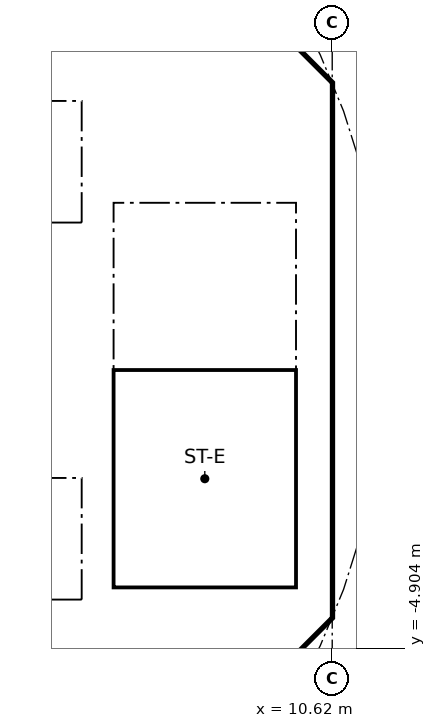
"""IFC4 building model, lengths in metres.
Left out: names, types, materials, properties, quantities, classifications, styles, units other than length and angle.
Written with IfcOpenShell. Run it as: python <this file> out.ifc"""

import sys

from ifc_helpers import new_model, si_unit, direction, frame, frame_2d, origin, place, context, subcontext, project, spatial, polyline, rectangle, outline, extrude, element, fill, save


model = new_model("IFC4")
c1 = context("Model", 3, precision=1e-05, world=origin(), true_north=direction((0.0, 1.0)))
c2 = subcontext(c1, "Body", "Model", "MODEL_VIEW")
j1 = project(units=[si_unit("LENGTHUNIT", "METRE"), si_unit("PLANEANGLEUNIT", "RADIAN")], contexts=[c1])
p1 = place(None, origin())
s1 = spatial("IfcSite", under=j1, at=p1, CompositionType="ELEMENT")
p2 = place(p1, origin())
s2 = spatial("IfcBuilding", under=s1, at=p2, CompositionType="ELEMENT")
p3 = place(p2, frame((0.0, 0.0, 219.6)))
s3 = spatial("IfcBuildingStorey", under=s2, at=p3, CompositionType="ELEMENT", Elevation=219.6)
p4 = place(p3, frame((9.988, 4.613, 0.0), z_axis=(0.0, 0.0, 1.0), x_axis=(-0.707106781187, 0.707106781187, 0.0)))
e1 = element("IfcWall", 1, at=p4, inside=s3, PredefinedType="SHEAR", context=c2, shape_type="SweptSolid", body=[
    extrude(rectangle(XDim=7.602, YDim=0.6, at=frame_2d((3.801, 0.0))), origin(), (0.0, 0.0, 1.0), 3.44),
])
p5 = place(p4, frame((3.201, 0.0, 0.0)))
e2 = element("IfcOpeningElement", 2, at=p5, cuts=e1, PredefinedType="OPENING", context=c2, shape_type="SweptSolid", body=[
    extrude(rectangle(XDim=1.2, YDim=2.1, at=frame_2d((0.6, 1.05))), frame((0.0, 0.31, 0.0), z_axis=(0.0, -1.0, 0.0), x_axis=(1.0, 0.0, 0.0)), (0.0, 0.0, 1.0), 0.62),
])
p6 = place(p3, frame((4.613, -9.988, 0.0), z_axis=(0.0, 0.0, 1.0), x_axis=(0.707106781187, 0.707106781187, 0.0)))
e3 = element("IfcWall", 3, at=p6, inside=s3, PredefinedType="SHEAR", context=c2, shape_type="SweptSolid", body=[
    extrude(rectangle(XDim=7.602, YDim=0.6, at=frame_2d((3.801, 0.0))), origin(), (0.0, 0.0, 1.0), 3.44),
])
p7 = place(p6, frame((3.201, 0.0, 0.0)))
e4 = element("IfcOpeningElement", 4, at=p7, cuts=e3, PredefinedType="OPENING", context=c2, shape_type="SweptSolid", body=[
    extrude(rectangle(XDim=1.2, YDim=2.1, at=frame_2d((0.6, 1.05))), frame((0.0, 0.31, 0.0), z_axis=(0.0, -1.0, 0.0), x_axis=(1.0, 0.0, 0.0)), (0.0, 0.0, 1.0), 0.62),
])
p8 = place(p3, frame((-6.7, 2.0, 0.0), z_axis=(0.0, 0.0, 1.0), x_axis=(1.0, 0.0, 0.0)))
e5 = element("IfcWall", 5, at=p8, inside=s3, PredefinedType="SOLIDWALL", context=c2, shape_type="SweptSolid", body=[
    extrude(rectangle(XDim=13.4, YDim=0.2, at=frame_2d((6.7, 0.0))), origin(), (0.0, 0.0, 1.0), 3.44),
])
p9 = place(p8, frame((7.25, 0.0, 0.0)))
e6 = element("IfcOpeningElement", 6, at=p9, cuts=e5, PredefinedType="OPENING", context=c2, shape_type="SweptSolid", body=[
    extrude(rectangle(XDim=1.1, YDim=2.1, at=frame_2d((0.55, 1.05))), frame((0.0, 0.11, 0.0), z_axis=(0.0, -1.0, 0.0), x_axis=(1.0, 0.0, 0.0)), (0.0, 0.0, 1.0), 0.22),
])
p10 = place(p8, frame((9.45, 0.0, 0.0)))
e7 = element("IfcOpeningElement", 7, at=p10, cuts=e5, PredefinedType="OPENING", context=c2, shape_type="SweptSolid", body=[
    extrude(rectangle(XDim=1.1, YDim=2.1, at=frame_2d((0.55, 1.05))), frame((0.0, 0.11, 0.0), z_axis=(0.0, -1.0, 0.0), x_axis=(1.0, 0.0, 0.0)), (0.0, 0.0, 1.0), 0.22),
])
p11 = place(p8, frame((1.85, 0.0, 0.0)))
e8 = element("IfcOpeningElement", 8, at=p11, cuts=e5, PredefinedType="OPENING", context=c2, shape_type="SweptSolid", body=[
    extrude(rectangle(XDim=0.9, YDim=2.1, at=frame_2d((0.45, 1.05))), frame((0.0, 0.11, 0.0), z_axis=(0.0, -1.0, 0.0), x_axis=(1.0, 0.0, 0.0)), (0.0, 0.0, 1.0), 0.22),
])
p12 = place(p8, frame((5.15, 0.0, 0.0)))
e9 = element("IfcOpeningElement", 9, at=p12, cuts=e5, PredefinedType="OPENING", context=c2, shape_type="SweptSolid", body=[
    extrude(rectangle(XDim=0.9, YDim=2.1, at=frame_2d((0.45, 1.05))), frame((0.0, 0.11, 0.0), z_axis=(0.0, -1.0, 0.0), x_axis=(1.0, 0.0, 0.0)), (0.0, 0.0, 1.0), 0.22),
])
p13 = place(p3, frame((6.7, 4.0, 0.0), z_axis=(0.0, 0.0, 1.0), x_axis=(1.0, 0.0, 0.0)))
e10 = element("IfcWall", 10, at=p13, inside=s3, PredefinedType="SOLIDWALL", context=c2, shape_type="SweptSolid", body=[
    extrude(rectangle(XDim=3.325, YDim=0.2, at=frame_2d((1.662, 0.0))), origin(), (0.0, 0.0, 1.0), 3.44),
])
p14 = place(p13, frame((1.25, 0.0, 0.0)))
e11 = element("IfcOpeningElement", 11, at=p14, cuts=e10, PredefinedType="OPENING", context=c2, shape_type="SweptSolid", body=[
    extrude(rectangle(XDim=1.1, YDim=2.1, at=frame_2d((0.55, 1.05))), frame((0.0, 0.11, 0.0), z_axis=(0.0, -1.0, 0.0), x_axis=(1.0, 0.0, 0.0)), (0.0, 0.0, 1.0), 0.22),
])
p15 = place(p3, frame((-6.7, -2.0, 0.0), z_axis=(0.0, 0.0, 1.0), x_axis=(1.0, 0.0, 0.0)))
e12 = element("IfcWall", 12, at=p15, inside=s3, PredefinedType="SOLIDWALL", context=c2, shape_type="SweptSolid", body=[
    extrude(rectangle(XDim=13.4, YDim=0.2, at=frame_2d((6.7, 0.0))), origin(), (0.0, 0.0, 1.0), 3.44),
])
p16 = place(p15, frame((5.05, 0.0, 0.0)))
e13 = element("IfcOpeningElement", 13, at=p16, cuts=e12, PredefinedType="OPENING", context=c2, shape_type="SweptSolid", body=[
    extrude(rectangle(XDim=1.1, YDim=2.1, at=frame_2d((0.55, 1.05))), frame((0.0, 0.11, 0.0), z_axis=(0.0, -1.0, 0.0), x_axis=(1.0, 0.0, 0.0)), (0.0, 0.0, 1.0), 0.22),
])
p17 = place(p15, frame((7.25, 0.0, 0.0)))
e14 = element("IfcOpeningElement", 14, at=p17, cuts=e12, PredefinedType="OPENING", context=c2, shape_type="SweptSolid", body=[
    extrude(rectangle(XDim=1.1, YDim=2.1, at=frame_2d((0.55, 1.05))), frame((0.0, 0.11, 0.0), z_axis=(0.0, -1.0, 0.0), x_axis=(1.0, 0.0, 0.0)), (0.0, 0.0, 1.0), 0.22),
])
p18 = place(p15, frame((1.85, 0.0, 0.0)))
e15 = element("IfcOpeningElement", 15, at=p18, cuts=e12, PredefinedType="OPENING", context=c2, shape_type="SweptSolid", body=[
    extrude(rectangle(XDim=0.9, YDim=2.1, at=frame_2d((0.45, 1.05))), frame((0.0, 0.11, 0.0), z_axis=(0.0, -1.0, 0.0), x_axis=(1.0, 0.0, 0.0)), (0.0, 0.0, 1.0), 0.22),
])
p19 = place(p3, origin())
e16 = element("IfcWall", 16, at=p19, inside=s3, PredefinedType="SHEAR", context=c2, shape_type="SweptSolid", body=[
    extrude(outline(polyline([(9.776, -4.401), (10.025, -4.152), (10.025, -3.801), (10.025, 4.152), (9.776, 4.401), (10.2, 4.825), (10.625, 4.401), (10.625, -4.401), (10.2, -4.825), (9.776, -4.401)])), origin(), (0.0, 0.0, 1.0), 3.44),
])
p20 = place(p3, origin())
e17 = element("IfcWall", 17, at=p20, inside=s3, PredefinedType="SOLIDWALL", context=c2, shape_type="SweptSolid", body=[
    extrude(outline(polyline([(-6.7, -2.1), (-6.5, -2.1), (-6.5, -4.1), (-2.3, -4.1), (-2.3, -2.1), (-2.1, -2.1), (-2.1, -4.1), (-0.1, -4.1), (-0.1, -2.1), (0.1, -2.1), (0.1, -4.1), (2.1, -4.1), (2.1, -2.1), (2.3, -2.1), (2.3, -4.1), (4.3, -4.1), (4.3, -2.1), (4.5, -2.1), (4.5, -4.1), (6.5, -4.1), (6.5, -2.1), (6.7, -2.1), (6.7, -4.3), (-6.7, -4.3), (-6.7, -2.1)])), origin(), (0.0, 0.0, 1.0), 3.44),
])
p21 = place(p3, origin())
e18 = element("IfcWall", 18, at=p21, inside=s3, PredefinedType="SOLIDWALL", context=c2, shape_type="SweptSolid", body=[
    extrude(outline(polyline([(-6.7, 4.3), (6.7, 4.3), (6.7, 2.1), (6.5, 2.1), (6.5, 4.1), (4.5, 4.1), (4.5, 2.1), (4.3, 2.1), (4.3, 4.1), (2.3, 4.1), (2.3, 2.1), (2.1, 2.1), (2.1, 4.1), (0.1, 4.1), (0.1, 2.1), (-0.1, 2.1), (-0.1, 4.1), (-2.1, 4.1), (-2.1, 2.1), (-2.3, 2.1), (-2.3, 4.1), (-6.5, 4.1), (-6.5, 2.1), (-6.7, 2.1), (-6.7, 4.3)])), origin(), (0.0, 0.0, 1.0), 3.44),
])
p22 = place(p3, origin())
e19 = element("IfcWall", 19, at=p22, inside=s3, PredefinedType="SOLIDWALL", context=c2, shape_type="SweptSolid", body=[
    extrude(outline(polyline([(7.025, -3.9), (6.7, -3.9), (6.7, 3.9), (7.025, 3.9), (7.025, -3.9)])), origin(), (0.0, 0.0, 1.0), 3.44),
])
p23 = place(p3, origin())
e20 = element("IfcWall", 20, at=p23, inside=s3, PredefinedType="SOLIDWALL", context=c2, shape_type="SweptSolid", body=[
    extrude(outline(polyline([(10.025, -4.1), (6.7, -4.1), (6.7, -3.9), (10.025, -3.9), (10.025, -4.1)])), origin(), (0.0, 0.0, 1.0), 3.44),
])
p24 = place(p14, frame((1.1, 0.0, 0.0), x_axis=(-1.0, 0.0, 0.0)))
e21 = element("IfcDoor", 21, at=p24, inside=s3, OperationType="SINGLE_SWING_RIGHT", PredefinedType="DOOR", context=c2, shape_type="SweptSolid", body=[
    extrude(rectangle(XDim=1.1, YDim=2.1, at=frame_2d((0.55, 1.05))), frame((0.0, 0.025, 0.0), z_axis=(0.0, -1.0, 0.0), x_axis=(1.0, 0.0, 0.0)), (0.0, 0.0, 1.0), 0.05),
])
fill(e11, e21)
save(model, sys.argv[1])
